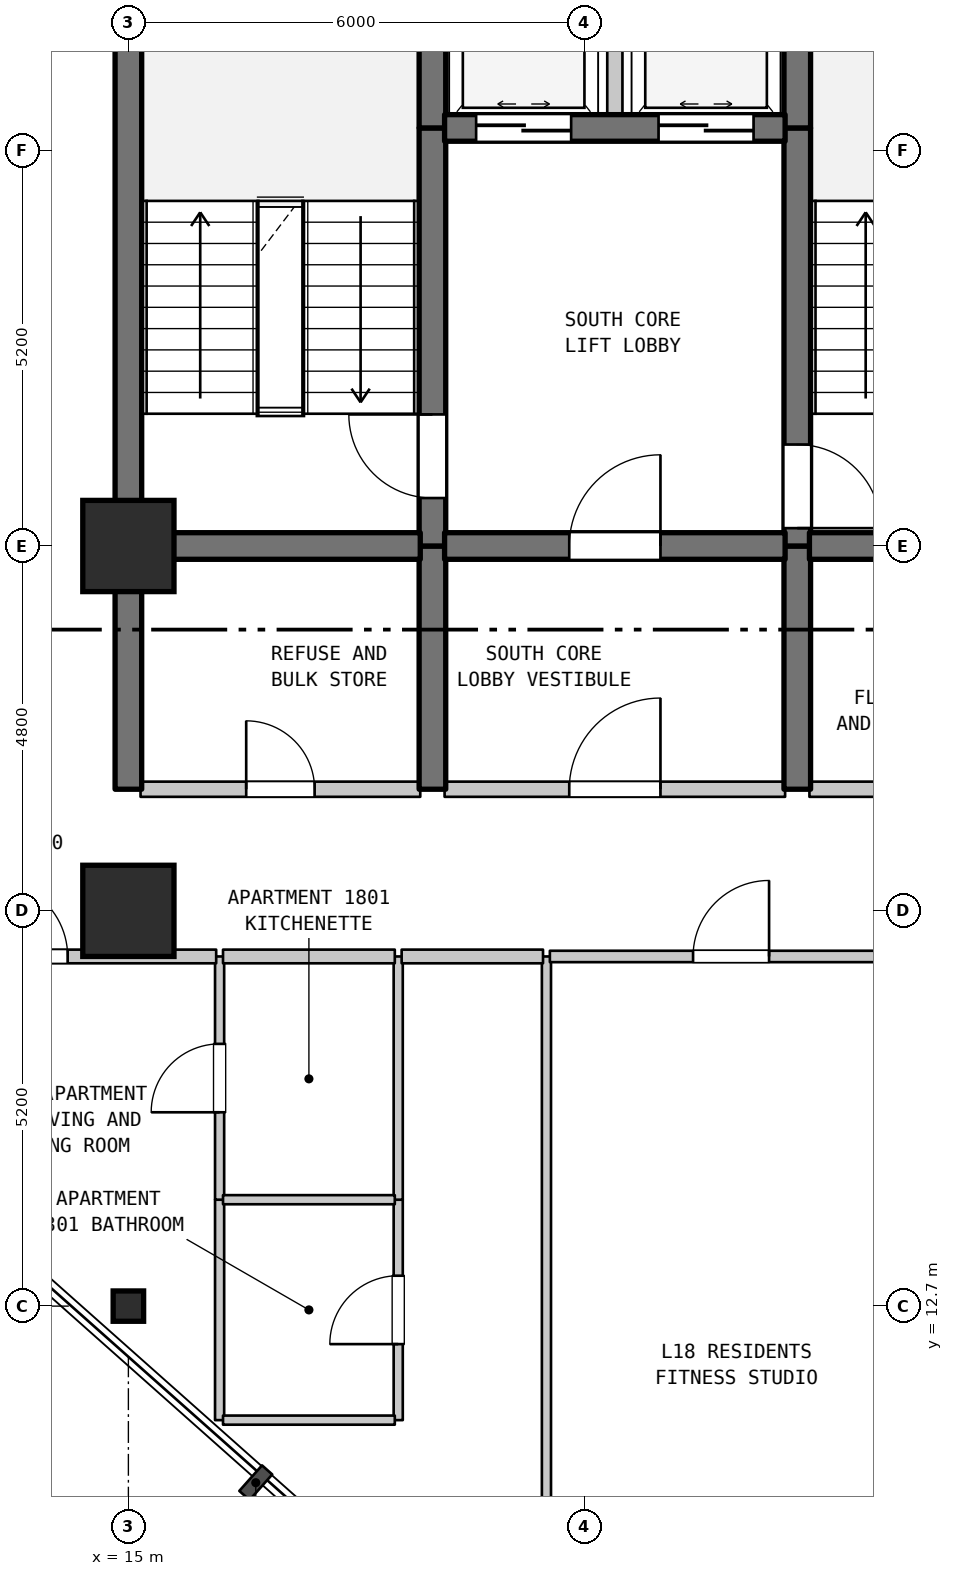
"""IFC4 building model, lengths in metres.
Left out: names, types, materials, properties, quantities, classifications, styles, units other than length and angle.
Written with IfcOpenShell. Run it as: python <this file> out.ifc"""

import sys

from ifc_helpers import new_model, si_unit, direction, frame, frame_2d, origin, origin_2d, place, context, subcontext, project, spatial, rectangle, i_section, extrude, element, fill, save


model = new_model("IFC4")
c1 = context("Model", 3, precision=1e-05, world=origin(), true_north=direction((0.0, 1.0)))
c2 = subcontext(c1, "Body", "Model", "MODEL_VIEW")
j1 = project(units=[si_unit("LENGTHUNIT", "METRE"), si_unit("PLANEANGLEUNIT", "RADIAN")], contexts=[c1])
p1 = place(None, origin())
s1 = spatial("IfcSite", under=j1, at=p1, CompositionType="ELEMENT")
p2 = place(p1, origin())
s2 = spatial("IfcBuilding", under=s1, at=p2, CompositionType="ELEMENT")
p3 = place(p2, frame((0.0, 0.0, 77.5)))
s3 = spatial("IfcBuildingStorey", under=s2, at=p3, CompositionType="ELEMENT", Elevation=77.5)
p4 = place(p3, frame((15.0, 12.7, 0.0), z_axis=(0.0, 0.0, 1.0), x_axis=(1.0, 0.0, 0.0)))
e1 = element("IfcColumn", 1, at=p4, inside=s3, PredefinedType="COLUMN", context=c2, shape_type="SweptSolid", body=[
    extrude(i_section(OverallWidth=0.401, OverallDepth=0.399, WebThickness=0.025, FlangeThickness=0.04, FilletRadius=0.015, at=origin_2d()), origin(), (0.0, 0.0, 1.0), 3.7),
])
for number, where, z_axis, x_axis in (
    (2, (15.0, 17.9, 0.0), (0.0, 0.0, 1.0), (1.0, 0.0, 0.0)),
    (3, (15.0, 22.7, 0.0), (0.0, 0.0, 1.0), (1.0, 0.0, 0.0)),
):
    element("IfcColumn", number, at=place(p3, frame(where, z_axis=z_axis, x_axis=x_axis)), inside=s3, PredefinedType="COLUMN", context=c2, shape_type="SweptSolid", body=[
        extrude(rectangle(XDim=1.2, YDim=1.2, at=origin_2d()), origin(), (0.0, 0.0, 1.0), 3.7),
    ])
p5 = place(p3, frame((15.0, 19.5, 0.0), z_axis=(0.0, 0.0, 1.0), x_axis=(0.0, 1.0, 0.0)))
e4 = element("IfcWall", 4, at=p5, inside=s3, PredefinedType="SHEAR", context=c2, shape_type="SweptSolid", body=[
    extrude(rectangle(XDim=3.2, YDim=0.35, at=frame_2d((1.6, 0.0))), origin(), (0.0, 0.0, 1.0), 3.28),
])
p6 = place(p3, frame((15.0, 22.7, 0.0), z_axis=(0.0, 0.0, 1.0), x_axis=(0.0, 1.0, 0.0)))
e5 = element("IfcWall", 5, at=p6, inside=s3, PredefinedType="SHEAR", context=c2, shape_type="SweptSolid", body=[
    extrude(rectangle(XDim=6.8, YDim=0.35, at=frame_2d((3.4, 0.0))), origin(), (0.0, 0.0, 1.0), 3.28),
])
p7 = place(p3, frame((16.2, 11.2, 0.0), z_axis=(0.0, 0.0, 1.0), x_axis=(0.0, 1.0, 0.0)))
e6 = element("IfcWall", 6, at=p7, inside=s3, PredefinedType="PARTITIONING", context=c2, shape_type="SweptSolid", body=[
    extrude(rectangle(XDim=2.9, YDim=0.12, at=frame_2d((1.45, 0.0))), origin(), (0.0, 0.0, 1.0), 3.28),
])
p8 = place(p3, frame((16.2, 14.1, 0.0), z_axis=(0.0, 0.0, 1.0), x_axis=(0.0, 1.0, 0.0)))
e7 = element("IfcWall", 7, at=p8, inside=s3, PredefinedType="PARTITIONING", context=c2, shape_type="SweptSolid", body=[
    extrude(rectangle(XDim=3.2, YDim=0.12, at=frame_2d((1.6, 0.0))), origin(), (0.0, 0.0, 1.0), 3.28),
])
p9 = place(p8, frame((1.15, 0.0, 0.0)))
e8 = element("IfcOpeningElement", 8, at=p9, cuts=e7, PredefinedType="OPENING", context=c2, shape_type="SweptSolid", body=[
    extrude(rectangle(XDim=0.9, YDim=2.15, at=frame_2d((0.45, 1.075))), frame((0.0, 0.07, 0.0), z_axis=(0.0, -1.0, 0.0), x_axis=(1.0, 0.0, 0.0)), (0.0, 0.0, 1.0), 0.14),
])
p10 = place(p3, frame((18.55, 11.2, 0.0), z_axis=(0.0, 0.0, 1.0), x_axis=(0.0, 1.0, 0.0)))
e9 = element("IfcWall", 9, at=p10, inside=s3, PredefinedType="PARTITIONING", context=c2, shape_type="SweptSolid", body=[
    extrude(rectangle(XDim=2.9, YDim=0.12, at=frame_2d((1.45, 0.0))), origin(), (0.0, 0.0, 1.0), 3.28),
])
p11 = place(p10, frame((1.0, 0.0, 0.0)))
e10 = element("IfcOpeningElement", 10, at=p11, cuts=e9, PredefinedType="OPENING", context=c2, shape_type="SweptSolid", body=[
    extrude(rectangle(XDim=0.9, YDim=2.1, at=frame_2d((0.45, 1.05))), frame((0.0, 0.07, 0.0), z_axis=(0.0, -1.0, 0.0), x_axis=(1.0, 0.0, 0.0)), (0.0, 0.0, 1.0), 0.14),
])
p12 = place(p3, frame((18.55, 14.1, 0.0), z_axis=(0.0, 0.0, 1.0), x_axis=(0.0, 1.0, 0.0)))
e11 = element("IfcWall", 11, at=p12, inside=s3, PredefinedType="PARTITIONING", context=c2, shape_type="SweptSolid", body=[
    extrude(rectangle(XDim=3.2, YDim=0.12, at=frame_2d((1.6, 0.0))), origin(), (0.0, 0.0, 1.0), 3.28),
])
p13 = place(p3, frame((19.0, 19.5, 0.0), z_axis=(0.0, 0.0, 1.0), x_axis=(0.0, 1.0, 0.0)))
e12 = element("IfcWall", 12, at=p13, inside=s3, PredefinedType="SHEAR", context=c2, shape_type="SweptSolid", body=[
    extrude(rectangle(XDim=3.2, YDim=0.35, at=frame_2d((1.6, 0.0))), origin(), (0.0, 0.0, 1.0), 3.28),
])
p14 = place(p3, frame((19.0, 22.7, 0.0), z_axis=(0.0, 0.0, 1.0), x_axis=(0.0, 1.0, 0.0)))
e13 = element("IfcWall", 13, at=p14, inside=s3, PredefinedType="SHEAR", context=c2, shape_type="SweptSolid", body=[
    extrude(rectangle(XDim=5.5, YDim=0.35, at=frame_2d((2.75, 0.0))), origin(), (0.0, 0.0, 1.0), 3.28),
])
p15 = place(p14, frame((0.631, 0.0, 0.0)))
e14 = element("IfcOpeningElement", 14, at=p15, cuts=e13, PredefinedType="OPENING", context=c2, shape_type="SweptSolid", body=[
    extrude(rectangle(XDim=1.1, YDim=2.15, at=frame_2d((0.55, 1.075))), frame((0.0, 0.185, 0.0), z_axis=(0.0, -1.0, 0.0), x_axis=(1.0, 0.0, 0.0)), (0.0, 0.0, 1.0), 0.37),
])
p16 = place(p3, frame((19.0, 28.2, 0.0), z_axis=(0.0, 0.0, 1.0), x_axis=(0.0, 1.0, 0.0)))
e15 = element("IfcWall", 15, at=p16, inside=s3, PredefinedType="SHEAR", context=c2, shape_type="SweptSolid", body=[
    extrude(rectangle(XDim=1.3, YDim=0.35, at=frame_2d((0.65, 0.0))), origin(), (0.0, 0.0, 1.0), 3.28),
])
p17 = place(p3, frame((20.5, 7.154, 0.0), z_axis=(0.0, 0.0, 1.0), x_axis=(0.0, 1.0, 0.0)))
e16 = element("IfcWall", 16, at=p17, inside=s3, PredefinedType="PARTITIONING", context=c2, shape_type="SweptSolid", body=[
    extrude(rectangle(XDim=10.146, YDim=0.12, at=frame_2d((5.073, 0.0))), origin(), (0.0, 0.0, 1.0), 3.28),
])
p18 = place(p3, frame((21.4, 28.2, 0.0), z_axis=(0.0, 0.0, 1.0), x_axis=(0.0, 1.0, 0.0)))
e17 = element("IfcWall", 17, at=p18, inside=s3, PredefinedType="STANDARD", context=c2, shape_type="SweptSolid", body=[
    extrude(rectangle(XDim=2.6, YDim=0.2, at=frame_2d((1.3, 0.0))), origin(), (0.0, 0.0, 1.0), 3.28),
])
p19 = place(p3, frame((23.8, 19.5, 0.0), z_axis=(0.0, 0.0, 1.0), x_axis=(0.0, 1.0, 0.0)))
e18 = element("IfcWall", 18, at=p19, inside=s3, PredefinedType="SHEAR", context=c2, shape_type="SweptSolid", body=[
    extrude(rectangle(XDim=3.2, YDim=0.35, at=frame_2d((1.6, 0.0))), origin(), (0.0, 0.0, 1.0), 3.28),
])
p20 = place(p3, frame((23.8, 22.7, 0.0), z_axis=(0.0, 0.0, 1.0), x_axis=(0.0, 1.0, 0.0)))
e19 = element("IfcWall", 19, at=p20, inside=s3, PredefinedType="SHEAR", context=c2, shape_type="SweptSolid", body=[
    extrude(rectangle(XDim=5.5, YDim=0.35, at=frame_2d((2.75, 0.0))), origin(), (0.0, 0.0, 1.0), 3.28),
])
p21 = place(p20, frame((0.235, 0.0, 0.0)))
e20 = element("IfcOpeningElement", 20, at=p21, cuts=e19, PredefinedType="OPENING", context=c2, shape_type="SweptSolid", body=[
    extrude(rectangle(XDim=1.1, YDim=2.15, at=frame_2d((0.55, 1.075))), frame((0.0, 0.185, 0.0), z_axis=(0.0, -1.0, 0.0), x_axis=(1.0, 0.0, 0.0)), (0.0, 0.0, 1.0), 0.37),
])
p22 = place(p3, frame((23.8, 28.2, 0.0), z_axis=(0.0, 0.0, 1.0), x_axis=(0.0, 1.0, 0.0)))
e21 = element("IfcWall", 21, at=p22, inside=s3, PredefinedType="SHEAR", context=c2, shape_type="SweptSolid", body=[
    extrude(rectangle(XDim=1.3, YDim=0.35, at=frame_2d((0.65, 0.0))), origin(), (0.0, 0.0, 1.0), 3.28),
])
for number, where, z_axis, x_axis in (
    (22, (16.245, 11.2, 0.0), (0.0, 0.0, 1.0), (1.0, 0.0, 0.0)),
    (23, (16.245, 14.1, 0.0), (0.0, 0.0, 1.0), (1.0, 0.0, 0.0)),
):
    element("IfcWall", number, at=place(p3, frame(where, z_axis=z_axis, x_axis=x_axis)), inside=s3, PredefinedType="PARTITIONING", context=c2, shape_type="SweptSolid", body=[
        extrude(rectangle(XDim=2.26, YDim=0.12, at=frame_2d((1.13, 0.0))), origin(), (0.0, 0.0, 1.0), 3.28),
    ])
p23 = place(p3, frame((12.875, 17.3, 0.0), z_axis=(0.0, 0.0, 1.0), x_axis=(1.0, 0.0, 0.0)))
e24 = element("IfcWall", 24, at=p23, inside=s3, PredefinedType="STANDARD", context=c2, shape_type="SweptSolid", body=[
    extrude(rectangle(XDim=3.28, YDim=0.18, at=frame_2d((1.64, 0.0))), origin(), (0.0, 0.0, 1.0), 3.28),
])
p24 = place(p23, frame((0.326, 0.0, 0.0)))
e25 = element("IfcOpeningElement", 25, at=p24, cuts=e24, PredefinedType="OPENING", context=c2, shape_type="SweptSolid", body=[
    extrude(rectangle(XDim=1.0, YDim=2.15, at=frame_2d((0.5, 1.075))), frame((0.0, 0.1, 0.0), z_axis=(0.0, -1.0, 0.0), x_axis=(1.0, 0.0, 0.0)), (0.0, 0.0, 1.0), 0.2),
])
p25 = place(p3, frame((16.245, 17.3, 0.0), z_axis=(0.0, 0.0, 1.0), x_axis=(1.0, 0.0, 0.0)))
e26 = element("IfcWall", 26, at=p25, inside=s3, PredefinedType="STANDARD", context=c2, shape_type="SweptSolid", body=[
    extrude(rectangle(XDim=2.26, YDim=0.18, at=frame_2d((1.13, 0.0))), origin(), (0.0, 0.0, 1.0), 3.28),
])
p26 = place(p3, frame((18.595, 17.3, 0.0), z_axis=(0.0, 0.0, 1.0), x_axis=(1.0, 0.0, 0.0)))
e27 = element("IfcWall", 27, at=p26, inside=s3, PredefinedType="STANDARD", context=c2, shape_type="SweptSolid", body=[
    extrude(rectangle(XDim=1.86, YDim=0.18, at=frame_2d((0.93, 0.0))), origin(), (0.0, 0.0, 1.0), 3.28),
])
p27 = place(p3, frame((20.545, 17.3, 0.0), z_axis=(0.0, 0.0, 1.0), x_axis=(1.0, 0.0, 0.0)))
e28 = element("IfcWall", 28, at=p27, inside=s3, PredefinedType="STANDARD", context=c2, shape_type="SweptSolid", body=[
    extrude(rectangle(XDim=4.91, YDim=0.15, at=frame_2d((2.455, 0.0))), origin(), (0.0, 0.0, 1.0), 3.28),
])
p28 = place(p27, frame((1.884, 0.0, 0.0)))
e29 = element("IfcOpeningElement", 29, at=p28, cuts=e28, PredefinedType="OPENING", context=c2, shape_type="SweptSolid", body=[
    extrude(rectangle(XDim=1.0, YDim=2.15, at=frame_2d((0.5, 1.075))), frame((0.0, 0.085, 0.0), z_axis=(0.0, -1.0, 0.0), x_axis=(1.0, 0.0, 0.0)), (0.0, 0.0, 1.0), 0.17),
])
p29 = place(p3, frame((15.16, 19.5, 0.0), z_axis=(0.0, 0.0, 1.0), x_axis=(1.0, 0.0, 0.0)))
e30 = element("IfcWall", 30, at=p29, inside=s3, PredefinedType="STANDARD", context=c2, shape_type="SweptSolid", body=[
    extrude(rectangle(XDim=3.68, YDim=0.2, at=frame_2d((1.84, 0.0))), origin(), (0.0, 0.0, 1.0), 3.28),
])
p30 = place(p29, frame((1.39, 0.0, 0.0)))
e31 = element("IfcOpeningElement", 31, at=p30, cuts=e30, PredefinedType="OPENING", context=c2, shape_type="SweptSolid", body=[
    extrude(rectangle(XDim=0.9, YDim=2.15, at=frame_2d((0.45, 1.075))), frame((0.0, 0.11, 0.0), z_axis=(0.0, -1.0, 0.0), x_axis=(1.0, 0.0, 0.0)), (0.0, 0.0, 1.0), 0.22),
])
p31 = place(p3, frame((19.16, 19.5, 0.0), z_axis=(0.0, 0.0, 1.0), x_axis=(1.0, 0.0, 0.0)))
e32 = element("IfcWall", 32, at=p31, inside=s3, PredefinedType="STANDARD", context=c2, shape_type="SweptSolid", body=[
    extrude(rectangle(XDim=4.48, YDim=0.2, at=frame_2d((2.24, 0.0))), origin(), (0.0, 0.0, 1.0), 3.28),
])
p32 = place(p31, frame((1.64, 0.0, 0.0)))
e33 = element("IfcOpeningElement", 33, at=p32, cuts=e32, PredefinedType="OPENING", context=c2, shape_type="SweptSolid", body=[
    extrude(rectangle(XDim=1.2, YDim=2.2, at=frame_2d((0.6, 1.1))), frame((0.0, 0.11, 0.0), z_axis=(0.0, -1.0, 0.0), x_axis=(1.0, 0.0, 0.0)), (0.0, 0.0, 1.0), 0.22),
])
p33 = place(p3, frame((23.96, 19.5, 0.0), z_axis=(0.0, 0.0, 1.0), x_axis=(1.0, 0.0, 0.0)))
e34 = element("IfcWall", 34, at=p33, inside=s3, PredefinedType="STANDARD", context=c2, shape_type="SweptSolid", body=[
    extrude(rectangle(XDim=3.155, YDim=0.2, at=frame_2d((1.578, 0.0))), origin(), (0.0, 0.0, 1.0), 3.28),
])
p34 = place(p33, frame((0.991, 0.0, 0.0)))
e35 = element("IfcOpeningElement", 35, at=p34, cuts=e34, PredefinedType="OPENING", context=c2, shape_type="SweptSolid", body=[
    extrude(rectangle(XDim=0.95, YDim=2.15, at=frame_2d((0.475, 1.075))), frame((0.0, 0.11, 0.0), z_axis=(0.0, -1.0, 0.0), x_axis=(1.0, 0.0, 0.0)), (0.0, 0.0, 1.0), 0.22),
])
p35 = place(p3, frame((15.16, 22.7, 0.0), z_axis=(0.0, 0.0, 1.0), x_axis=(1.0, 0.0, 0.0)))
e36 = element("IfcWall", 36, at=p35, inside=s3, PredefinedType="SHEAR", context=c2, shape_type="SweptSolid", body=[
    extrude(rectangle(XDim=3.68, YDim=0.35, at=frame_2d((1.84, 0.0))), origin(), (0.0, 0.0, 1.0), 3.28),
])
p36 = place(p3, frame((19.16, 22.7, 0.0), z_axis=(0.0, 0.0, 1.0), x_axis=(1.0, 0.0, 0.0)))
e37 = element("IfcWall", 37, at=p36, inside=s3, PredefinedType="SHEAR", context=c2, shape_type="SweptSolid", body=[
    extrude(rectangle(XDim=4.48, YDim=0.35, at=frame_2d((2.24, 0.0))), origin(), (0.0, 0.0, 1.0), 3.28),
])
p37 = place(p36, frame((1.64, 0.0, 0.0)))
e38 = element("IfcOpeningElement", 38, at=p37, cuts=e37, PredefinedType="OPENING", context=c2, shape_type="SweptSolid", body=[
    extrude(rectangle(XDim=1.2, YDim=2.2, at=frame_2d((0.6, 1.1))), frame((0.0, 0.185, 0.0), z_axis=(0.0, -1.0, 0.0), x_axis=(1.0, 0.0, 0.0)), (0.0, 0.0, 1.0), 0.37),
])
p38 = place(p3, frame((23.96, 22.7, 0.0), z_axis=(0.0, 0.0, 1.0), x_axis=(1.0, 0.0, 0.0)))
e39 = element("IfcWall", 39, at=p38, inside=s3, PredefinedType="SHEAR", context=c2, shape_type="SweptSolid", body=[
    extrude(rectangle(XDim=3.155, YDim=0.35, at=frame_2d((1.578, 0.0))), origin(), (0.0, 0.0, 1.0), 3.28),
])
p39 = place(p3, frame((19.16, 28.2, 0.0), z_axis=(0.0, 0.0, 1.0), x_axis=(1.0, 0.0, 0.0)))
e40 = element("IfcWall", 40, at=p39, inside=s3, PredefinedType="SHEAR", context=c2, shape_type="SweptSolid", body=[
    extrude(rectangle(XDim=4.48, YDim=0.35, at=frame_2d((2.24, 0.0))), origin(), (0.0, 0.0, 1.0), 3.28),
])
p40 = place(p39, frame((0.415, 0.0, 0.0)))
e41 = element("IfcOpeningElement", 41, at=p40, cuts=e40, PredefinedType="OPENING", context=c2, shape_type="SweptSolid", body=[
    extrude(rectangle(XDim=1.25, YDim=2.2, at=frame_2d((0.625, 1.1))), frame((0.0, 0.185, 0.0), z_axis=(0.0, -1.0, 0.0), x_axis=(1.0, 0.0, 0.0)), (0.0, 0.0, 1.0), 0.37),
])
p41 = place(p39, frame((2.815, 0.0, 0.0)))
e42 = element("IfcOpeningElement", 42, at=p41, cuts=e40, PredefinedType="OPENING", context=c2, shape_type="SweptSolid", body=[
    extrude(rectangle(XDim=1.25, YDim=2.2, at=frame_2d((0.625, 1.1))), frame((0.0, 0.185, 0.0), z_axis=(0.0, -1.0, 0.0), x_axis=(1.0, 0.0, 0.0)), (0.0, 0.0, 1.0), 0.37),
])
p42 = place(p9, origin())
e43 = element("IfcDoor", 43, at=p42, inside=s3, OperationType="SINGLE_SWING_LEFT", PredefinedType="DOOR", context=c2, shape_type="SweptSolid", body=[
    extrude(rectangle(XDim=0.9, YDim=2.15, at=frame_2d((0.45, 1.075))), frame((0.0, 0.025, 0.0), z_axis=(0.0, -1.0, 0.0), x_axis=(1.0, 0.0, 0.0)), (0.0, 0.0, 1.0), 0.05),
])
fill(e8, e43)
p43 = place(p11, origin())
e44 = element("IfcDoor", 44, at=p43, inside=s3, OperationType="SINGLE_SWING_LEFT", PredefinedType="DOOR", context=c2, shape_type="SweptSolid", body=[
    extrude(rectangle(XDim=0.9, YDim=2.1, at=frame_2d((0.45, 1.05))), frame((0.0, 0.025, 0.0), z_axis=(0.0, -1.0, 0.0), x_axis=(1.0, 0.0, 0.0)), (0.0, 0.0, 1.0), 0.05),
])
fill(e10, e44)
p44 = place(p15, origin())
e45 = element("IfcDoor", 45, at=p44, inside=s3, OperationType="SINGLE_SWING_RIGHT", PredefinedType="DOOR", context=c2, shape_type="SweptSolid", body=[
    extrude(rectangle(XDim=1.1, YDim=2.15, at=frame_2d((0.55, 1.075))), frame((0.0, 0.025, 0.0), z_axis=(0.0, -1.0, 0.0), x_axis=(1.0, 0.0, 0.0)), (0.0, 0.0, 1.0), 0.05),
])
fill(e14, e45)
p45 = place(p21, frame((1.1, 0.0, 0.0), z_axis=(0.0, 0.0, 1.0), x_axis=(-1.0, 0.0, 0.0)))
e46 = element("IfcDoor", 46, at=p45, inside=s3, OperationType="SINGLE_SWING_LEFT", PredefinedType="DOOR", context=c2, shape_type="SweptSolid", body=[
    extrude(rectangle(XDim=1.1, YDim=2.15, at=frame_2d((0.55, 1.075))), frame((0.0, 0.025, 0.0), z_axis=(0.0, -1.0, 0.0), x_axis=(1.0, 0.0, 0.0)), (0.0, 0.0, 1.0), 0.05),
])
fill(e20, e46)
p46 = place(p24, origin())
e47 = element("IfcDoor", 47, at=p46, inside=s3, OperationType="SINGLE_SWING_LEFT", PredefinedType="DOOR", context=c2, shape_type="SweptSolid", body=[
    extrude(rectangle(XDim=1.0, YDim=2.15, at=frame_2d((0.5, 1.075))), frame((0.0, 0.025, 0.0), z_axis=(0.0, -1.0, 0.0), x_axis=(1.0, 0.0, 0.0)), (0.0, 0.0, 1.0), 0.05),
])
fill(e25, e47)
p47 = place(p28, origin())
e48 = element("IfcDoor", 48, at=p47, inside=s3, OperationType="SINGLE_SWING_RIGHT", PredefinedType="DOOR", context=c2, shape_type="SweptSolid", body=[
    extrude(rectangle(XDim=1.0, YDim=2.15, at=frame_2d((0.5, 1.075))), frame((0.0, 0.025, 0.0), z_axis=(0.0, -1.0, 0.0), x_axis=(1.0, 0.0, 0.0)), (0.0, 0.0, 1.0), 0.05),
])
fill(e29, e48)
p48 = place(p30, origin())
e49 = element("IfcDoor", 49, at=p48, inside=s3, OperationType="SINGLE_SWING_LEFT", PredefinedType="DOOR", context=c2, shape_type="SweptSolid", body=[
    extrude(rectangle(XDim=0.9, YDim=2.15, at=frame_2d((0.45, 1.075))), frame((0.0, 0.025, 0.0), z_axis=(0.0, -1.0, 0.0), x_axis=(1.0, 0.0, 0.0)), (0.0, 0.0, 1.0), 0.05),
])
fill(e31, e49)
p49 = place(p32, origin())
e50 = element("IfcDoor", 50, at=p49, inside=s3, OperationType="SINGLE_SWING_RIGHT", PredefinedType="DOOR", context=c2, shape_type="SweptSolid", body=[
    extrude(rectangle(XDim=1.2, YDim=2.2, at=frame_2d((0.6, 1.1))), frame((0.0, 0.025, 0.0), z_axis=(0.0, -1.0, 0.0), x_axis=(1.0, 0.0, 0.0)), (0.0, 0.0, 1.0), 0.05),
])
fill(e33, e50)
p50 = place(p37, origin())
e51 = element("IfcDoor", 51, at=p50, inside=s3, OperationType="SINGLE_SWING_RIGHT", PredefinedType="DOOR", context=c2, shape_type="SweptSolid", body=[
    extrude(rectangle(XDim=1.2, YDim=2.2, at=frame_2d((0.6, 1.1))), frame((0.0, 0.025, 0.0), z_axis=(0.0, -1.0, 0.0), x_axis=(1.0, 0.0, 0.0)), (0.0, 0.0, 1.0), 0.05),
])
fill(e38, e51)
p51 = place(p40, origin())
e52 = element("IfcDoor", 52, at=p51, inside=s3, OperationType="DOUBLE_DOOR_SLIDING", PredefinedType="DOOR", context=c2, shape_type="SweptSolid", body=[
    extrude(rectangle(XDim=1.25, YDim=2.2, at=frame_2d((0.625, 1.1))), frame((0.0, 0.025, 0.0), z_axis=(0.0, -1.0, 0.0), x_axis=(1.0, 0.0, 0.0)), (0.0, 0.0, 1.0), 0.05),
])
fill(e41, e52)
p52 = place(p41, origin())
e53 = element("IfcDoor", 53, at=p52, inside=s3, OperationType="DOUBLE_DOOR_SLIDING", PredefinedType="DOOR", context=c2, shape_type="SweptSolid", body=[
    extrude(rectangle(XDim=1.25, YDim=2.2, at=frame_2d((0.625, 1.1))), frame((0.0, 0.025, 0.0), z_axis=(0.0, -1.0, 0.0), x_axis=(1.0, 0.0, 0.0)), (0.0, 0.0, 1.0), 0.05),
])
fill(e42, e53)
save(model, sys.argv[1])
